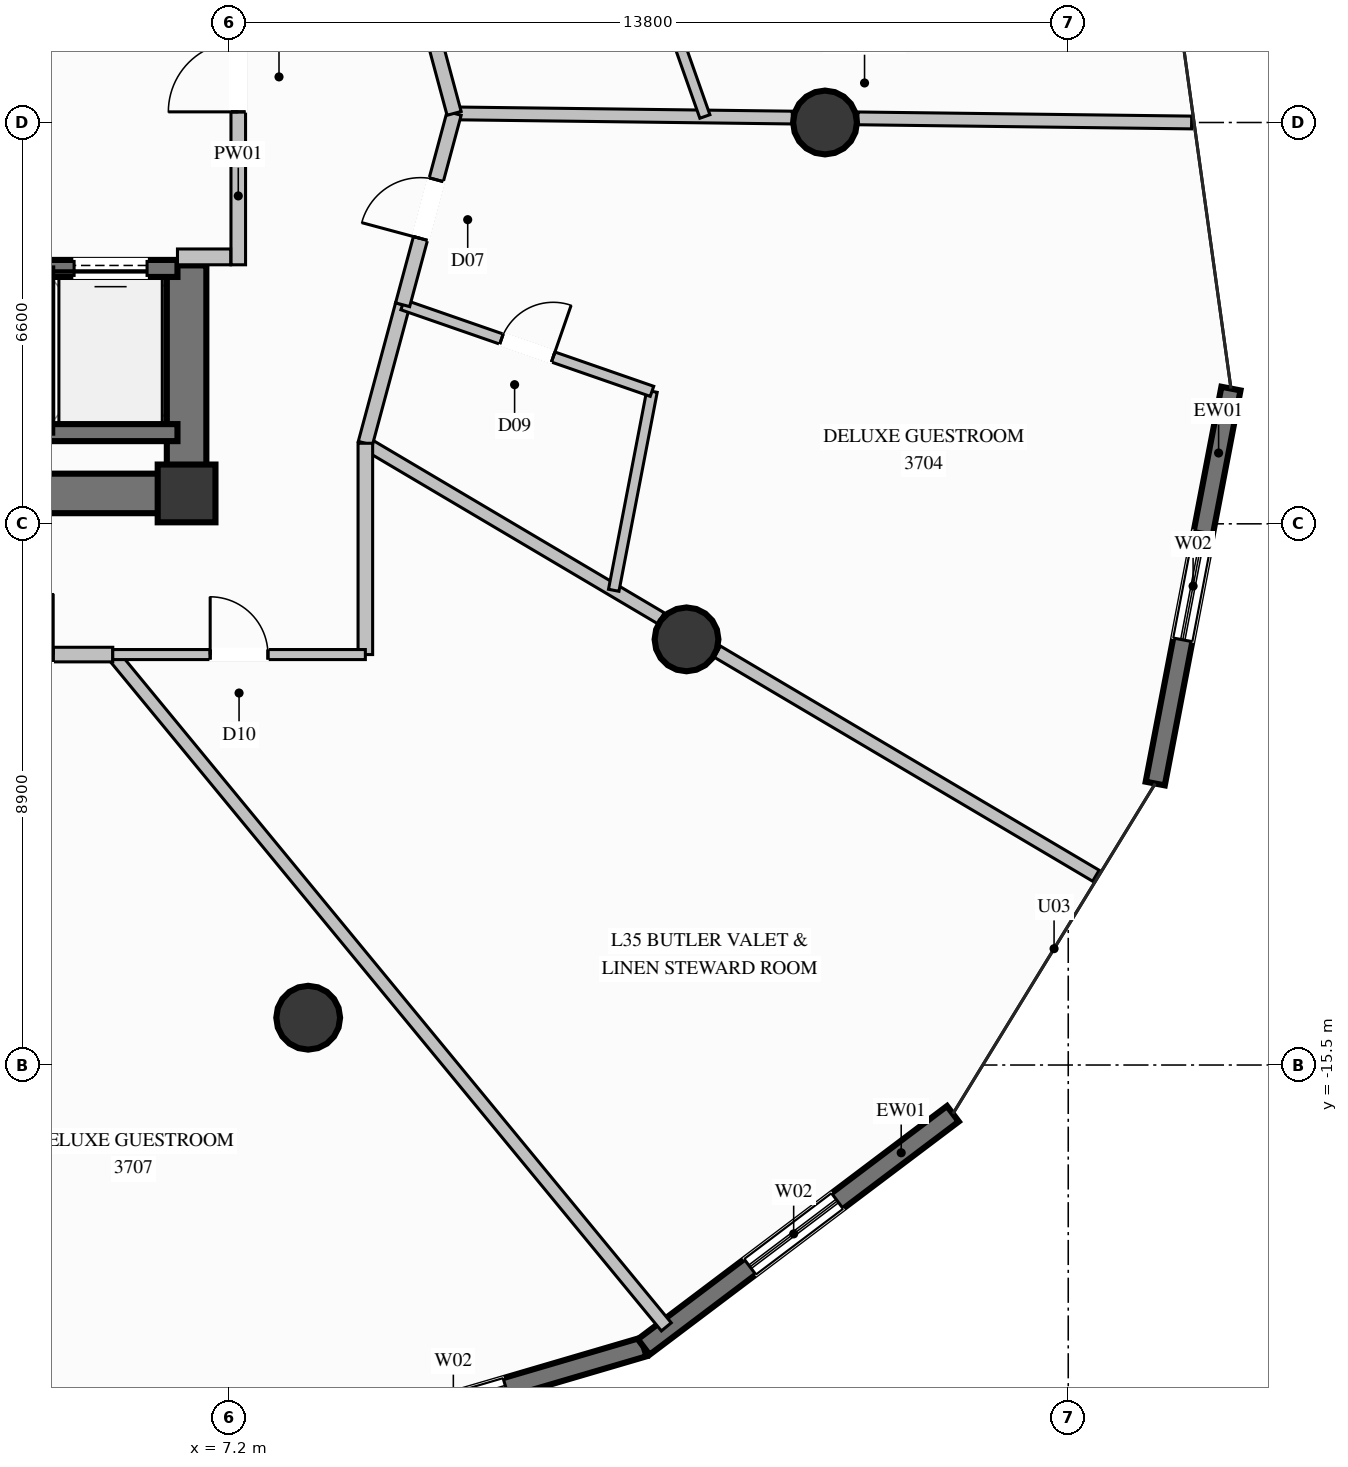
"""IFC4 building model, lengths in metres.
Left out: names, types, materials, properties, quantities, classifications, styles, units other than length and angle.
Written with IfcOpenShell. Run it as: python <this file> out.ifc"""

import sys

from ifc_helpers import new_model, si_unit, direction, frame, frame_2d, origin, origin_2d, place, context, subcontext, project, spatial, rectangle, circle, extrude, element, fill, save


model = new_model("IFC4")
c1 = context("Model", 3, precision=1e-05, world=origin(), true_north=direction((0.0, 1.0)))
c2 = subcontext(c1, "Body", "Model", "MODEL_VIEW")
j1 = project(units=[si_unit("LENGTHUNIT", "METRE"), si_unit("PLANEANGLEUNIT", "RADIAN")], contexts=[c1])
p1 = place(None, origin())
s1 = spatial("IfcSite", under=j1, at=p1, CompositionType="ELEMENT")
p2 = place(p1, origin())
s2 = spatial("IfcBuilding", under=s1, at=p2, CompositionType="ELEMENT")
p3 = place(p2, frame((0.0, 0.0, 138.6)))
s3 = spatial("IfcBuildingStorey", under=s2, at=p3, CompositionType="ELEMENT", Elevation=138.6)
p4 = place(p3, frame((6.5, -6.1, 0.0), z_axis=(0.0, 0.0, 1.0), x_axis=(1.0, 0.0, 0.0)))
e1 = element("IfcColumn", 1, at=p4, inside=s3, PredefinedType="COLUMN", context=c2, shape_type="SweptSolid", body=[
    extrude(rectangle(XDim=0.95, YDim=0.95, at=origin_2d()), origin(), (0.0, 0.0, 1.0), 3.6),
])
p5 = place(p3, frame((4.15, -6.1, 0.0), z_axis=(0.0, 0.0, 1.0), x_axis=(1.0, 0.0, 0.0)))
e2 = element("IfcWall", 2, at=p5, inside=s3, PredefinedType="SHEAR", context=c2, shape_type="SweptSolid", body=[
    extrude(rectangle(XDim=2.025, YDim=0.65, at=frame_2d((1.013, 0.0))), origin(), (0.0, 0.0, 1.0), 3.6),
])
p6 = place(p3, frame((6.5, -6.425, 0.0), z_axis=(0.0, 0.0, 1.0), x_axis=(0.0, 1.0, 0.0)))
e3 = element("IfcWall", 3, at=p6, inside=s3, PredefinedType="SHEAR", context=c2, shape_type="SweptSolid", body=[
    extrude(rectangle(XDim=4.075, YDim=0.65, at=frame_2d((2.038, 0.0))), origin(), (0.0, 0.0, 1.0), 3.6),
])
for number, where, z_axis, x_axis in (
    (4, (17.0, 0.0, 0.0), (0.0, 0.0, 1.0), (1.0, 0.0, 0.0)),
    (5, (8.5, -14.722, 0.0), (0.0, 0.0, 1.0), (1.0, 0.0, 0.0)),
    (6, (14.722, -8.5, 0.0), (0.0, 0.0, 1.0), (1.0, 0.0, 0.0)),
):
    element("IfcColumn", number, at=place(p3, frame(where, z_axis=z_axis, x_axis=x_axis)), inside=s3, PredefinedType="COLUMN", context=c2, shape_type="SweptSolid", body=[
        extrude(circle(Radius=0.525, at=origin_2d()), origin(), (0.0, 0.0, 1.0), 3.6),
    ])
p7 = place(p3, frame((23.676, -4.376, 0.0), z_axis=(0.0, 0.0, 1.0), x_axis=(-0.188272291084, -0.982116869018, 0.0)))
e7 = element("IfcWall", 7, at=p7, inside=s3, PredefinedType="SOLIDWALL", context=c2, shape_type="SweptSolid", body=[
    extrude(rectangle(XDim=6.613, YDim=0.32, at=frame_2d((3.307, 0.0))), origin(), (0.0, 0.0, 1.0), 3.35),
])
p8 = place(p7, frame((2.407, 0.0, 0.35)))
e8 = element("IfcOpeningElement", 8, at=p8, cuts=e7, PredefinedType="OPENING", context=c2, shape_type="SweptSolid", body=[
    extrude(rectangle(XDim=1.8, YDim=2.6, at=frame_2d((0.9, 1.3))), frame((0.0, 0.17, 0.0), z_axis=(0.0, -1.0, 0.0), x_axis=(1.0, 0.0, 0.0)), (0.0, 0.0, 1.0), 0.34),
])
p9 = place(p3, frame((14.018, -20.137, 0.0), z_axis=(0.0, 0.0, 1.0), x_axis=(-0.959493561685, -0.28173055405, 0.0)))
e9 = element("IfcWall", 9, at=p9, inside=s3, PredefinedType="SOLIDWALL", context=c2, shape_type="SweptSolid", body=[
    extrude(rectangle(XDim=6.613, YDim=0.32, at=frame_2d((3.306, 0.0))), origin(), (0.0, 0.0, 1.0), 3.35),
])
p10 = place(p9, frame((2.363, 0.0, 0.35)))
e10 = element("IfcOpeningElement", 10, at=p10, cuts=e9, PredefinedType="OPENING", context=c2, shape_type="SweptSolid", body=[
    extrude(rectangle(XDim=1.8, YDim=2.6, at=frame_2d((0.9, 1.3))), frame((0.0, 0.17, 0.0), z_axis=(0.0, -1.0, 0.0), x_axis=(1.0, 0.0, 0.0)), (0.0, 0.0, 1.0), 0.34),
])
p11 = place(p3, frame((19.103, -16.302, 0.0), z_axis=(0.0, 0.0, 1.0), x_axis=(-0.798396373417, -0.602132237067, 0.0)))
e11 = element("IfcWall", 11, at=p11, inside=s3, PredefinedType="SOLIDWALL", context=c2, shape_type="SweptSolid", body=[
    extrude(rectangle(XDim=6.369, YDim=0.32, at=frame_2d((3.185, 0.0))), origin(), (0.0, 0.0, 1.0), 3.35),
])
p12 = place(p11, frame((2.38, 0.0, 0.35)))
e12 = element("IfcOpeningElement", 12, at=p12, cuts=e11, PredefinedType="OPENING", context=c2, shape_type="SweptSolid", body=[
    extrude(rectangle(XDim=1.8, YDim=2.6, at=frame_2d((0.9, 1.3))), frame((0.0, 0.17, 0.0), z_axis=(0.0, -1.0, 0.0), x_axis=(1.0, 0.0, 0.0)), (0.0, 0.0, 1.0), 0.34),
])
p13 = place(p3, frame((4.15, -5.1, 0.0), z_axis=(0.0, 0.0, 1.0), x_axis=(1.0, 0.0, 0.0)))
e13 = element("IfcWall", 13, at=p13, inside=s3, PredefinedType="SOLIDWALL", context=c2, shape_type="SweptSolid", body=[
    extrude(rectangle(XDim=2.2, YDim=0.28, at=frame_2d((1.1, 0.0))), origin(), (0.0, 0.0, 1.0), 3.35),
])
p14 = place(p3, frame((6.35, -2.4, 0.0), z_axis=(0.0, 0.0, 1.0), x_axis=(-1.0, 0.0, 0.0)))
e14 = element("IfcWall", 14, at=p14, inside=s3, PredefinedType="SOLIDWALL", context=c2, shape_type="SweptSolid", body=[
    extrude(rectangle(XDim=2.2, YDim=0.28, at=frame_2d((1.1, 0.0))), origin(), (0.0, 0.0, 1.0), 3.35),
])
p15 = place(p14, frame((0.5, 0.0, 0.0)))
e15 = element("IfcOpeningElement", 15, at=p15, cuts=e14, PredefinedType="OPENING", context=c2, shape_type="SweptSolid", body=[
    extrude(rectangle(XDim=1.2, YDim=2.2, at=frame_2d((0.6, 1.1))), frame((0.0, 0.15, 0.0), z_axis=(0.0, -1.0, 0.0), x_axis=(1.0, 0.0, 0.0)), (0.0, 0.0, 1.0), 0.3),
])
p16 = place(p3, frame((4.15, -2.4, 0.0), z_axis=(0.0, 0.0, 1.0), x_axis=(0.0, -1.0, 0.0)))
e16 = element("IfcWall", 16, at=p16, inside=s3, PredefinedType="SOLIDWALL", context=c2, shape_type="SweptSolid", body=[
    extrude(rectangle(XDim=2.7, YDim=0.28, at=frame_2d((1.35, 0.0))), origin(), (0.0, 0.0, 1.0), 3.35),
])
p17 = place(p3, frame((7.35, -2.34, 0.0), z_axis=(0.0, 0.0, 1.0), x_axis=(0.0, 1.0, 0.0)))
e17 = element("IfcWall", 17, at=p17, inside=s3, PredefinedType="PARTITIONING", context=c2, shape_type="SweptSolid", body=[
    extrude(rectangle(XDim=5.02, YDim=0.24, at=frame_2d((2.51, 0.0))), origin(), (0.0, 0.0, 1.0), 2.435),
])
p18 = place(p17, frame((2.515, 0.0, 0.0)))
e18 = element("IfcOpeningElement", 18, at=p18, cuts=e17, PredefinedType="OPENING", context=c2, shape_type="SweptSolid", body=[
    extrude(rectangle(XDim=1.15, YDim=2.2, at=frame_2d((0.575, 1.1))), frame((0.0, 0.13, 0.0), z_axis=(0.0, -1.0, 0.0), x_axis=(1.0, 0.0, 0.0)), (0.0, 0.0, 1.0), 0.26),
])
p19 = place(p3, frame((6.35, -2.21, 0.0), z_axis=(0.0, 0.0, 1.0), x_axis=(1.0, 0.0, 0.0)))
e19 = element("IfcWall", 19, at=p19, inside=s3, PredefinedType="PARTITIONING", context=c2, shape_type="SweptSolid", body=[
    extrude(rectangle(XDim=0.875, YDim=0.26, at=frame_2d((0.438, 0.0))), origin(), (0.0, 0.0, 1.0), 3.35),
])
p20 = place(p3, frame((10.9, 0.15, 0.0), z_axis=(0.0, 0.0, 1.0), x_axis=(0.999923372065, -0.012379418339, 0.0)))
e20 = element("IfcWall", 20, at=p20, inside=s3, PredefinedType="PARTITIONING", context=c2, shape_type="SweptSolid", body=[
    extrude(rectangle(XDim=5.562, YDim=0.21, at=frame_2d((2.781, 0.0))), origin(), (0.0, 0.0, 1.0), 3.35),
])
p21 = place(p3, frame((17.541, 0.068, 0.0), z_axis=(0.0, 0.0, 1.0), x_axis=(0.999922985187, -0.012410628269, 0.0)))
e21 = element("IfcWall", 21, at=p21, inside=s3, PredefinedType="PARTITIONING", context=c2, shape_type="SweptSolid", body=[
    extrude(rectangle(XDim=5.489, YDim=0.21, at=frame_2d((2.744, 0.0))), origin(), (0.0, 0.0, 1.0), 3.35),
])
p22 = place(p3, frame((9.44, -5.275, 0.0), z_axis=(0.0, 0.0, 1.0), x_axis=(0.860527977628, -0.509403179927, 0.0)))
e22 = element("IfcWall", 22, at=p22, inside=s3, PredefinedType="PARTITIONING", context=c2, shape_type="SweptSolid", body=[
    extrude(rectangle(XDim=5.65, YDim=0.21, at=frame_2d((2.825, 0.0))), origin(), (0.0, 0.0, 1.0), 2.791),
])
p23 = place(p3, frame((15.228, -8.701, 0.0), z_axis=(0.0, 0.0, 1.0), x_axis=(0.860538050529, -0.509386163526, 0.0)))
e23 = element("IfcWall", 23, at=p23, inside=s3, PredefinedType="PARTITIONING", context=c2, shape_type="SweptSolid", body=[
    extrude(rectangle(XDim=7.236, YDim=0.21, at=frame_2d((3.618, 0.0))), origin(), (0.0, 0.0, 1.0), 3.35),
])
p24 = place(p3, frame((9.44, -5.275, 0.0), z_axis=(0.0, 0.0, 1.0), x_axis=(0.25988439237, 0.965639737481, 0.0)))
e24 = element("IfcWall", 24, at=p24, inside=s3, PredefinedType="PARTITIONING", context=c2, shape_type="SweptSolid", body=[
    extrude(rectangle(XDim=2.359, YDim=0.24, at=frame_2d((1.179, 0.0))), origin(), (0.0, 0.0, 1.0), 3.35),
])
p25 = place(p3, frame((13.525, -7.693, 0.0), z_axis=(0.0, 0.0, 1.0), x_axis=(0.188812065938, 0.982013240112, 0.0)))
e25 = element("IfcWall", 25, at=p25, inside=s3, PredefinedType="PLUMBINGWALL", context=c2, shape_type="SweptSolid", body=[
    extrude(rectangle(XDim=3.332, YDim=0.175, at=frame_2d((1.666, 0.0))), origin(), (0.0, 0.0, 1.0), 3.35),
])
p26 = place(p3, frame((10.053, -2.997, 0.0), z_axis=(0.0, 0.0, 1.0), x_axis=(0.944684797039, -0.327979624737, 0.0)))
e26 = element("IfcWall", 26, at=p26, inside=s3, PredefinedType="PLUMBINGWALL", context=c2, shape_type="SweptSolid", body=[
    extrude(rectangle(XDim=4.341, YDim=0.175, at=frame_2d((2.171, 0.0))), origin(), (0.0, 0.0, 1.0), 3.35),
])
p27 = place(p26, frame((1.721, 0.0, 0.0)))
e27 = element("IfcOpeningElement", 27, at=p27, cuts=e26, PredefinedType="OPENING", context=c2, shape_type="SweptSolid", body=[
    extrude(rectangle(XDim=0.9, YDim=2.1, at=frame_2d((0.45, 1.05))), frame((0.0, 0.098, 0.0), z_axis=(0.0, -1.0, 0.0), x_axis=(1.0, 0.0, 0.0)), (0.0, 0.0, 1.0), 0.195),
])
p28 = place(p3, frame((10.053, -2.997, 0.0), z_axis=(0.0, 0.0, 1.0), x_axis=(0.259876755553, 0.965641792759, 0.0)))
e28 = element("IfcWall", 28, at=p28, inside=s3, PredefinedType="PARTITIONING", context=c2, shape_type="SweptSolid", body=[
    extrude(rectangle(XDim=3.259, YDim=0.24, at=frame_2d((1.629, 0.0))), origin(), (0.0, 0.0, 1.0), 2.985),
])
p29 = place(p28, frame((1.129, 0.0, 0.0)))
e29 = element("IfcOpeningElement", 29, at=p29, cuts=e28, PredefinedType="OPENING", context=c2, shape_type="SweptSolid", body=[
    extrude(rectangle(XDim=1.0, YDim=2.2, at=frame_2d((0.5, 1.1))), frame((0.0, 0.13, 0.0), z_axis=(0.0, -1.0, 0.0), x_axis=(1.0, 0.0, 0.0)), (0.0, 0.0, 1.0), 0.26),
])
p30 = place(p3, frame((10.9, 0.15, 0.0), z_axis=(0.0, 0.0, 1.0), x_axis=(-0.259761917731, 0.965672690976, 0.0)))
e30 = element("IfcWall", 30, at=p30, inside=s3, PredefinedType="PARTITIONING", context=c2, shape_type="SweptSolid", body=[
    extrude(rectangle(XDim=2.359, YDim=0.24, at=frame_2d((1.18, 0.0))), origin(), (0.0, 0.0, 1.0), 2.985),
])
p31 = place(p3, frame((15.024, 0.099, 0.0), z_axis=(0.0, 0.0, 1.0), x_axis=(-0.332461284511, 0.943116903836, 0.0)))
e31 = element("IfcWall", 31, at=p31, inside=s3, PredefinedType="PLUMBINGWALL", context=c2, shape_type="SweptSolid", body=[
    extrude(rectangle(XDim=3.203, YDim=0.175, at=frame_2d((1.602, 0.0))), origin(), (0.0, 0.0, 1.0), 3.35),
])
p32 = place(p3, frame((5.286, -8.75, 0.0), z_axis=(0.0, 0.0, 1.0), x_axis=(0.635671401386, -0.771959758964, 0.0)))
e32 = element("IfcWall", 32, at=p32, inside=s3, PredefinedType="PARTITIONING", context=c2, shape_type="SweptSolid", body=[
    extrude(rectangle(XDim=14.322, YDim=0.21, at=frame_2d((7.161, 0.0))), origin(), (0.0, 0.0, 1.0), 3.35),
])
p33 = place(p3, frame((2.326, -8.75, 0.0), z_axis=(0.0, 0.0, 1.0), x_axis=(1.0, 0.0, 0.0)))
e33 = element("IfcWall", 33, at=p33, inside=s3, PredefinedType="PARTITIONING", context=c2, shape_type="SweptSolid", body=[
    extrude(rectangle(XDim=2.96, YDim=0.24, at=frame_2d((1.48, 0.0))), origin(), (0.0, 0.0, 1.0), 3.35),
])
p34 = place(p33, frame((0.98, 0.0, 0.0)))
e34 = element("IfcOpeningElement", 34, at=p34, cuts=e33, PredefinedType="OPENING", context=c2, shape_type="SweptSolid", body=[
    extrude(rectangle(XDim=1.0, YDim=2.2, at=frame_2d((0.5, 1.1))), frame((0.0, 0.13, 0.0), z_axis=(0.0, -1.0, 0.0), x_axis=(1.0, 0.0, 0.0)), (0.0, 0.0, 1.0), 0.26),
])
p35 = place(p3, frame((9.44, -8.75, 0.0), z_axis=(0.0, 0.0, 1.0), x_axis=(0.0, 1.0, 0.0)))
e35 = element("IfcWall", 35, at=p35, inside=s3, PredefinedType="PARTITIONING", context=c2, shape_type="SweptSolid", body=[
    extrude(rectangle(XDim=3.475, YDim=0.24, at=frame_2d((1.738, 0.0))), origin(), (0.0, 0.0, 1.0), 3.35),
])
p36 = place(p3, frame((5.286, -8.75, 0.0), z_axis=(0.0, 0.0, 1.0), x_axis=(1.0, 0.0, 0.0)))
e36 = element("IfcWall", 36, at=p36, inside=s3, PredefinedType="PARTITIONING", context=c2, shape_type="SweptSolid", body=[
    extrude(rectangle(XDim=4.154, YDim=0.165, at=frame_2d((2.077, 0.0))), origin(), (0.0, 0.0, 1.0), 3.35),
])
p37 = place(p36, frame((1.602, 0.0, 0.0)))
e37 = element("IfcOpeningElement", 37, at=p37, cuts=e36, PredefinedType="OPENING", context=c2, shape_type="SweptSolid", body=[
    extrude(rectangle(XDim=0.95, YDim=2.1, at=frame_2d((0.475, 1.05))), frame((0.0, 0.093, 0.0), z_axis=(0.0, -1.0, 0.0), x_axis=(1.0, 0.0, 0.0)), (0.0, 0.0, 1.0), 0.185),
])
p38 = place(p8, origin())
e38 = element("IfcWindow", 38, at=p38, inside=s3, PartitioningType="SINGLE_PANEL", PredefinedType="WINDOW", context=c2, shape_type="SweptSolid", body=[
    extrude(rectangle(XDim=1.8, YDim=2.6, at=frame_2d((0.9, 1.3))), frame((0.0, 0.03, 0.0), z_axis=(0.0, -1.0, 0.0), x_axis=(1.0, 0.0, 0.0)), (0.0, 0.0, 1.0), 0.06),
])
fill(e8, e38)
p39 = place(p10, origin())
e39 = element("IfcWindow", 39, at=p39, inside=s3, PartitioningType="SINGLE_PANEL", PredefinedType="WINDOW", context=c2, shape_type="SweptSolid", body=[
    extrude(rectangle(XDim=1.8, YDim=2.6, at=frame_2d((0.9, 1.3))), frame((0.0, 0.03, 0.0), z_axis=(0.0, -1.0, 0.0), x_axis=(1.0, 0.0, 0.0)), (0.0, 0.0, 1.0), 0.06),
])
fill(e10, e39)
p40 = place(p12, origin())
e40 = element("IfcWindow", 40, at=p40, inside=s3, PartitioningType="SINGLE_PANEL", PredefinedType="WINDOW", context=c2, shape_type="SweptSolid", body=[
    extrude(rectangle(XDim=1.8, YDim=2.6, at=frame_2d((0.9, 1.3))), frame((0.0, 0.03, 0.0), z_axis=(0.0, -1.0, 0.0), x_axis=(1.0, 0.0, 0.0)), (0.0, 0.0, 1.0), 0.06),
])
fill(e12, e40)
p41 = place(p15, origin())
e41 = element("IfcDoor", 41, at=p41, inside=s3, OperationType="SLIDING_TO_LEFT", PredefinedType="DOOR", context=c2, shape_type="SweptSolid", body=[
    extrude(rectangle(XDim=1.2, YDim=2.2, at=frame_2d((0.6, 1.1))), frame((0.0, 0.025, 0.0), z_axis=(0.0, -1.0, 0.0), x_axis=(1.0, 0.0, 0.0)), (0.0, 0.0, 1.0), 0.05),
])
fill(e15, e41)
p42 = place(p18, origin())
e42 = element("IfcDoor", 42, at=p42, inside=s3, OperationType="SINGLE_SWING_LEFT", PredefinedType="DOOR", context=c2, shape_type="SweptSolid", body=[
    extrude(rectangle(XDim=1.15, YDim=2.2, at=frame_2d((0.575, 1.1))), frame((0.0, 0.025, 0.0), z_axis=(0.0, -1.0, 0.0), x_axis=(1.0, 0.0, 0.0)), (0.0, 0.0, 1.0), 0.05),
])
fill(e18, e42)
p43 = place(p27, origin())
e43 = element("IfcDoor", 43, at=p43, inside=s3, OperationType="SINGLE_SWING_RIGHT", PredefinedType="DOOR", context=c2, shape_type="SweptSolid", body=[
    extrude(rectangle(XDim=0.9, YDim=2.1, at=frame_2d((0.45, 1.05))), frame((0.0, 0.025, 0.0), z_axis=(0.0, -1.0, 0.0), x_axis=(1.0, 0.0, 0.0)), (0.0, 0.0, 1.0), 0.05),
])
fill(e27, e43)
p44 = place(p29, origin())
e44 = element("IfcDoor", 44, at=p44, inside=s3, OperationType="SINGLE_SWING_LEFT", PredefinedType="DOOR", context=c2, shape_type="SweptSolid", body=[
    extrude(rectangle(XDim=1.0, YDim=2.2, at=frame_2d((0.5, 1.1))), frame((0.0, 0.025, 0.0), z_axis=(0.0, -1.0, 0.0), x_axis=(1.0, 0.0, 0.0)), (0.0, 0.0, 1.0), 0.05),
])
fill(e29, e44)
p45 = place(p34, origin())
e45 = element("IfcDoor", 45, at=p45, inside=s3, OperationType="SINGLE_SWING_RIGHT", PredefinedType="DOOR", context=c2, shape_type="SweptSolid", body=[
    extrude(rectangle(XDim=1.0, YDim=2.2, at=frame_2d((0.5, 1.1))), frame((0.0, 0.025, 0.0), z_axis=(0.0, -1.0, 0.0), x_axis=(1.0, 0.0, 0.0)), (0.0, 0.0, 1.0), 0.05),
])
fill(e34, e45)
p46 = place(p37, origin())
e46 = element("IfcDoor", 46, at=p46, inside=s3, OperationType="SINGLE_SWING_LEFT", PredefinedType="DOOR", context=c2, shape_type="SweptSolid", body=[
    extrude(rectangle(XDim=0.95, YDim=2.1, at=frame_2d((0.475, 1.05))), frame((0.0, 0.025, 0.0), z_axis=(0.0, -1.0, 0.0), x_axis=(1.0, 0.0, 0.0)), (0.0, 0.0, 1.0), 0.05),
])
fill(e37, e46)
save(model, sys.argv[1])
